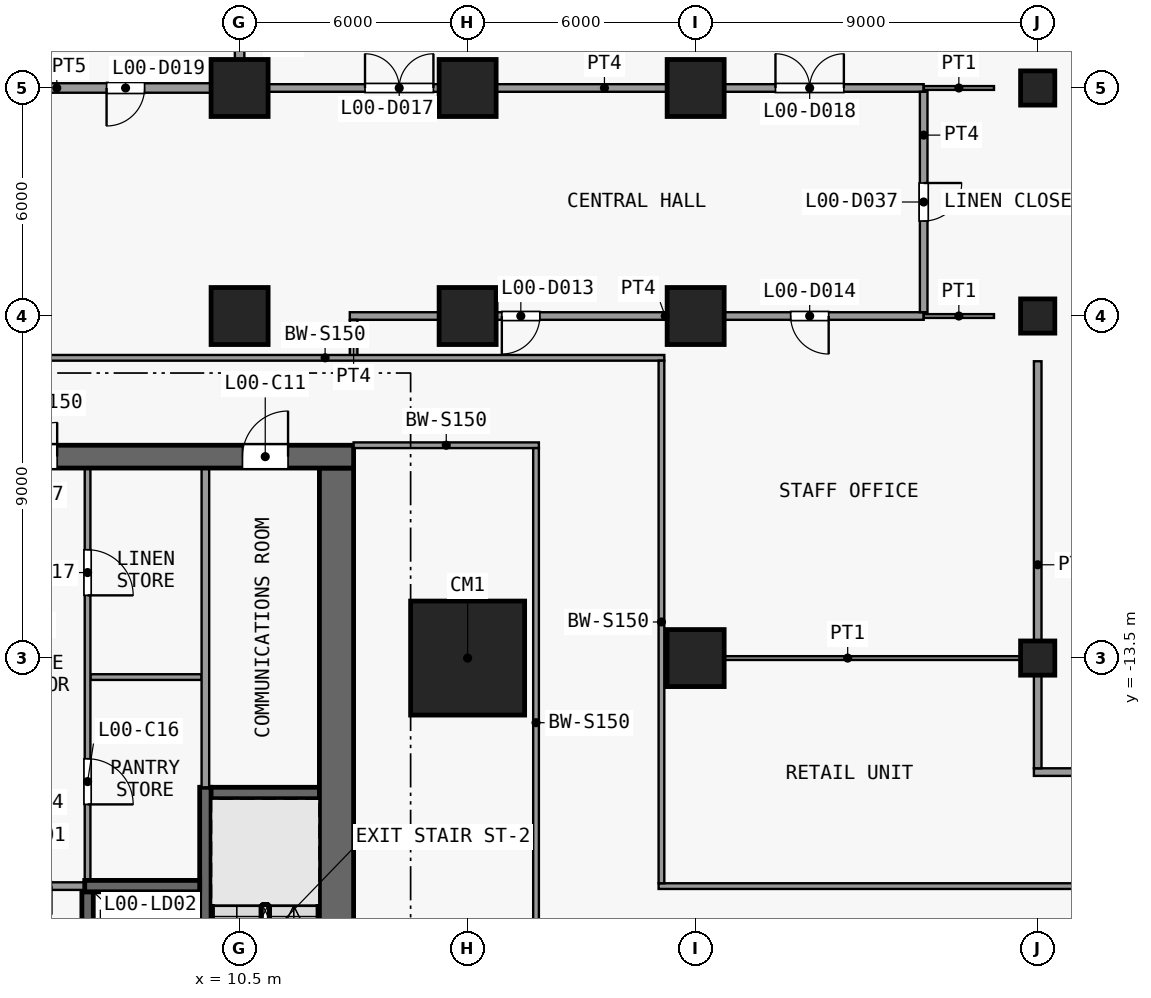
"""IFC4 building model, lengths in metres.
Left out: names, types, materials, properties, quantities, classifications, styles, units other than length and angle.
Written with IfcOpenShell. Run it as: python <this file> out.ifc"""

import sys

from ifc_helpers import new_model, si_unit, direction, frame, frame_2d, origin, origin_2d, place, context, subcontext, project, spatial, rectangle, extrude, element, fill, save


model = new_model("IFC4")
c1 = context("Model", 3, precision=1e-05, world=origin(), true_north=direction((0.0, 1.0)))
c2 = subcontext(c1, "Body", "Model", "MODEL_VIEW")
j1 = project(units=[si_unit("LENGTHUNIT", "METRE"), si_unit("PLANEANGLEUNIT", "RADIAN")], contexts=[c1])
p1 = place(None, origin())
s1 = spatial("IfcSite", under=j1, at=p1, CompositionType="ELEMENT")
p2 = place(p1, origin())
s2 = spatial("IfcBuilding", under=s1, at=p2, CompositionType="ELEMENT")
p3 = place(p2, origin())
s3 = spatial("IfcBuildingStorey", under=s2, at=p3, CompositionType="ELEMENT", Elevation=0.0)
for number, where, z_axis, x_axis in (
    (1, (10.5, -4.5, 0.0), (0.0, 0.0, 1.0), (1.0, 0.0, 0.0)),
    (2, (10.5, 1.5, 0.0), (0.0, 0.0, 1.0), (1.0, 0.0, 0.0)),
):
    element("IfcColumn", number, at=place(p3, frame(where, z_axis=z_axis, x_axis=x_axis)), inside=s3, PredefinedType="COLUMN", context=c2, shape_type="SweptSolid", body=[
        extrude(rectangle(XDim=1.5, YDim=1.5, at=origin_2d()), origin(), (0.0, 0.0, 1.0), 8.0),
    ])
p4 = place(p3, frame((16.5, -13.5, 0.0), z_axis=(0.0, 0.0, 1.0), x_axis=(1.0, 0.0, 0.0)))
e3 = element("IfcColumn", 3, at=p4, inside=s3, PredefinedType="COLUMN", context=c2, shape_type="SweptSolid", body=[
    extrude(rectangle(XDim=3.0, YDim=3.0, at=origin_2d()), origin(), (0.0, 0.0, 1.0), 8.0),
])
for number, where, z_axis, x_axis in (
    (4, (16.5, -4.5, 0.0), (0.0, 0.0, 1.0), (1.0, 0.0, 0.0)),
    (5, (16.5, 1.5, 0.0), (0.0, 0.0, 1.0), (1.0, 0.0, 0.0)),
    (6, (22.5, -13.5, 0.0), (0.0, 0.0, 1.0), (1.0, 0.0, 0.0)),
    (7, (22.5, -4.5, 0.0), (0.0, 0.0, 1.0), (1.0, 0.0, 0.0)),
    (8, (22.5, 1.5, 0.0), (0.0, 0.0, 1.0), (1.0, 0.0, 0.0)),
):
    element("IfcColumn", number, at=place(p3, frame(where, z_axis=z_axis, x_axis=x_axis)), inside=s3, PredefinedType="COLUMN", context=c2, shape_type="SweptSolid", body=[
        extrude(rectangle(XDim=1.5, YDim=1.5, at=origin_2d()), origin(), (0.0, 0.0, 1.0), 8.0),
    ])
for number, where, z_axis, x_axis in (
    (9, (31.5, -13.5, 0.0), (0.0, 0.0, 1.0), (1.0, 0.0, 0.0)),
    (10, (31.5, -4.5, 0.0), (0.0, 0.0, 1.0), (1.0, 0.0, 0.0)),
    (11, (31.5, 1.5, 0.0), (0.0, 0.0, 1.0), (1.0, 0.0, 0.0)),
):
    element("IfcColumn", number, at=place(p3, frame(where, z_axis=z_axis, x_axis=x_axis)), inside=s3, PredefinedType="COLUMN", context=c2, shape_type="SweptSolid", body=[
        extrude(rectangle(XDim=0.9, YDim=0.9, at=origin_2d()), origin(), (0.0, 0.0, 1.0), 8.0),
    ])
p5 = place(p3, frame((-13.5, -8.2, 0.0), z_axis=(0.0, 0.0, 1.0), x_axis=(1.0, 0.0, 0.0)))
e12 = element("IfcWall", 12, at=p5, inside=s3, PredefinedType="SHEAR", context=c2, shape_type="SweptSolid", body=[
    extrude(rectangle(XDim=27.0, YDim=0.6, at=frame_2d((13.5, 0.0))), origin(), (0.0, 0.0, 1.0), 7.65),
])
p6 = place(p5, frame((7.8, 0.0, 0.0)))
e13 = element("IfcOpeningElement", 13, at=p6, cuts=e12, PredefinedType="OPENING", context=c2, shape_type="SweptSolid", body=[
    extrude(rectangle(XDim=1.8, YDim=2.1, at=frame_2d((0.9, 1.05))), frame((0.0, 0.31, 0.0), z_axis=(0.0, -1.0, 0.0), x_axis=(1.0, 0.0, 0.0)), (0.0, 0.0, 1.0), 0.62),
])
p7 = place(p5, frame((17.4, 0.0, 0.0)))
e14 = element("IfcOpeningElement", 14, at=p7, cuts=e12, PredefinedType="OPENING", context=c2, shape_type="SweptSolid", body=[
    extrude(rectangle(XDim=1.8, YDim=2.1, at=frame_2d((0.9, 1.05))), frame((0.0, 0.31, 0.0), z_axis=(0.0, -1.0, 0.0), x_axis=(1.0, 0.0, 0.0)), (0.0, 0.0, 1.0), 0.62),
])
p8 = place(p5, frame((2.725, 0.0, 0.0)))
e15 = element("IfcOpeningElement", 15, at=p8, cuts=e12, PredefinedType="OPENING", context=c2, shape_type="SweptSolid", body=[
    extrude(rectangle(XDim=0.9, YDim=2.1, at=frame_2d((0.45, 1.05))), frame((0.0, 0.31, 0.0), z_axis=(0.0, -1.0, 0.0), x_axis=(1.0, 0.0, 0.0)), (0.0, 0.0, 1.0), 0.62),
])
p9 = place(p5, frame((24.075, 0.0, 0.0)))
e16 = element("IfcOpeningElement", 16, at=p9, cuts=e12, PredefinedType="OPENING", context=c2, shape_type="SweptSolid", body=[
    extrude(rectangle(XDim=1.2, YDim=2.1, at=frame_2d((0.6, 1.05))), frame((0.0, 0.31, 0.0), z_axis=(0.0, -1.0, 0.0), x_axis=(1.0, 0.0, 0.0)), (0.0, 0.0, 1.0), 0.62),
])
p10 = place(p3, frame((13.05, -24.6, 0.0), z_axis=(0.0, 0.0, 1.0), x_axis=(0.0, 1.0, 0.0)))
e17 = element("IfcWall", 17, at=p10, inside=s3, PredefinedType="SHEAR", context=c2, shape_type="SweptSolid", body=[
    extrude(rectangle(XDim=16.1, YDim=0.9, at=frame_2d((8.05, 0.0))), origin(), (0.0, 0.0, 1.0), 7.65),
])
p11 = place(p3, frame((6.575, -19.5, 0.0), z_axis=(0.0, 0.0, 1.0), x_axis=(-1.0, 0.0, 0.0)))
e18 = element("IfcWall", 18, at=p11, inside=s3, PredefinedType="PARTITIONING", context=c2, shape_type="SweptSolid", body=[
    extrude(rectangle(XDim=3.55, YDim=0.2, at=frame_2d((1.775, 0.0))), origin(), (0.0, 0.0, 1.0), 7.65),
])
p12 = place(p11, frame((1.025, 0.0, 0.0)))
e19 = element("IfcOpeningElement", 19, at=p12, cuts=e18, PredefinedType="OPENING", context=c2, shape_type="SweptSolid", body=[
    extrude(rectangle(XDim=1.5, YDim=2.1, at=frame_2d((0.75, 1.05))), frame((0.0, 0.11, 0.0), z_axis=(0.0, -1.0, 0.0), x_axis=(1.0, 0.0, 0.0)), (0.0, 0.0, 1.0), 0.22),
])
p13 = place(p3, frame((6.425, -19.5, 0.0), z_axis=(0.0, 0.0, 1.0), x_axis=(1.0, 0.0, 0.0)))
e20 = element("IfcWall", 20, at=p13, inside=s3, PredefinedType="SHEAR", context=c2, shape_type="SweptSolid", body=[
    extrude(rectangle(XDim=3.025, YDim=0.3, at=frame_2d((1.512, 0.0))), origin(), (0.0, 0.0, 1.0), 7.65),
])
p14 = place(p3, frame((9.5, -17.05, 0.0), z_axis=(0.0, 0.0, 1.0), x_axis=(1.0, 0.0, 0.0)))
e21 = element("IfcWall", 21, at=p14, inside=s3, PredefinedType="SHEAR", context=c2, shape_type="SweptSolid", body=[
    extrude(rectangle(XDim=3.1, YDim=0.3, at=frame_2d((1.55, 0.0))), origin(), (0.0, 0.0, 1.0), 7.65),
])
p15 = place(p3, frame((6.575, -14.0, 0.0), z_axis=(0.0, 0.0, 1.0), x_axis=(1.0, 0.0, 0.0)))
e22 = element("IfcWall", 22, at=p15, inside=s3, PredefinedType="PARTITIONING", context=c2, shape_type="SweptSolid", body=[
    extrude(rectangle(XDim=2.925, YDim=0.15, at=frame_2d((1.462, 0.0))), origin(), (0.0, 0.0, 1.0), 7.65),
])
p16 = place(p3, frame((6.5, -22.25, 0.0), z_axis=(0.0, 0.0, 1.0), x_axis=(0.0, 1.0, 0.0)))
e23 = element("IfcWall", 23, at=p16, inside=s3, PredefinedType="SHEAR", context=c2, shape_type="SweptSolid", body=[
    extrude(rectangle(XDim=2.6, YDim=0.3, at=frame_2d((1.3, 0.0))), origin(), (0.0, 0.0, 1.0), 7.65),
])
p17 = place(p16, frame((0.75, 0.0, 0.0)))
e24 = element("IfcOpeningElement", 24, at=p17, cuts=e23, PredefinedType="OPENING", context=c2, shape_type="SweptSolid", body=[
    extrude(rectangle(XDim=1.1, YDim=2.1, at=frame_2d((0.55, 1.05))), frame((0.0, 0.16, 0.0), z_axis=(0.0, -1.0, 0.0), x_axis=(1.0, 0.0, 0.0)), (0.0, 0.0, 1.0), 0.32),
])
p18 = place(p3, frame((6.5, -8.5, 0.0), z_axis=(0.0, 0.0, 1.0), x_axis=(0.0, -1.0, 0.0)))
e25 = element("IfcWall", 25, at=p18, inside=s3, PredefinedType="PARTITIONING", context=c2, shape_type="SweptSolid", body=[
    extrude(rectangle(XDim=10.85, YDim=0.15, at=frame_2d((5.425, 0.0))), origin(), (0.0, 0.0, 1.0), 7.65),
])
p19 = place(p18, frame((7.65, 0.0, 0.0)))
e26 = element("IfcOpeningElement", 26, at=p19, cuts=e25, PredefinedType="OPENING", context=c2, shape_type="SweptSolid", body=[
    extrude(rectangle(XDim=1.2, YDim=2.1, at=frame_2d((0.6, 1.05))), frame((0.0, 0.085, 0.0), z_axis=(0.0, -1.0, 0.0), x_axis=(1.0, 0.0, 0.0)), (0.0, 0.0, 1.0), 0.17),
])
p20 = place(p18, frame((2.15, 0.0, 0.0)))
e27 = element("IfcOpeningElement", 27, at=p20, cuts=e25, PredefinedType="OPENING", context=c2, shape_type="SweptSolid", body=[
    extrude(rectangle(XDim=1.2, YDim=2.1, at=frame_2d((0.6, 1.05))), frame((0.0, 0.085, 0.0), z_axis=(0.0, -1.0, 0.0), x_axis=(1.0, 0.0, 0.0)), (0.0, 0.0, 1.0), 0.17),
])
p21 = place(p3, frame((9.6, -16.9, 0.0), z_axis=(0.0, 0.0, 1.0), x_axis=(0.0, -1.0, 0.0)))
e28 = element("IfcWall", 28, at=p21, inside=s3, PredefinedType="SHEAR", context=c2, shape_type="SweptSolid", body=[
    extrude(rectangle(XDim=7.7, YDim=0.3, at=frame_2d((3.85, 0.0))), origin(), (0.0, 0.0, 1.0), 7.65),
])
p22 = place(p21, frame((6.5, 0.0, 0.0)))
e29 = element("IfcOpeningElement", 29, at=p22, cuts=e28, PredefinedType="OPENING", context=c2, shape_type="SweptSolid", body=[
    extrude(rectangle(XDim=1.1, YDim=2.1, at=frame_2d((0.55, 1.05))), frame((0.0, 0.16, 0.0), z_axis=(0.0, -1.0, 0.0), x_axis=(1.0, 0.0, 0.0)), (0.0, 0.0, 1.0), 0.32),
])
p23 = place(p3, frame((9.6, -16.9, 0.0), z_axis=(0.0, 0.0, 1.0), x_axis=(0.0, 1.0, 0.0)))
e30 = element("IfcWall", 30, at=p23, inside=s3, PredefinedType="PARTITIONING", context=c2, shape_type="SweptSolid", body=[
    extrude(rectangle(XDim=8.4, YDim=0.2, at=frame_2d((4.2, 0.0))), origin(), (0.0, 0.0, 1.0), 7.65),
])
p24 = place(p3, frame((21.525, -19.5, 0.0), z_axis=(0.0, 0.0, 1.0), x_axis=(1.0, 0.0, 0.0)))
e31 = element("IfcWall", 31, at=p24, inside=s3, PredefinedType="PARTITIONING", context=c2, shape_type="SweptSolid", body=[
    extrude(rectangle(XDim=28.05, YDim=0.15, at=frame_2d((14.025, 0.0))), origin(), (0.0, 0.0, 1.0), 7.65),
])
p25 = place(p3, frame((13.5, -7.9, 0.0), z_axis=(0.0, 0.0, 1.0), x_axis=(1.0, 0.0, 0.0)))
e32 = element("IfcWall", 32, at=p25, inside=s3, PredefinedType="PARTITIONING", context=c2, shape_type="SweptSolid", body=[
    extrude(rectangle(XDim=4.875, YDim=0.15, at=frame_2d((2.438, 0.0))), origin(), (0.0, 0.0, 1.0), 7.65),
])
p26 = place(p3, frame((3.825, -5.6, 0.0), z_axis=(0.0, 0.0, 1.0), x_axis=(1.0, 0.0, 0.0)))
e33 = element("IfcWall", 33, at=p26, inside=s3, PredefinedType="PARTITIONING", context=c2, shape_type="SweptSolid", body=[
    extrude(rectangle(XDim=17.85, YDim=0.15, at=frame_2d((8.925, 0.0))), origin(), (0.0, 0.0, 1.0), 7.65),
])
p27 = place(p3, frame((18.3, -22.425, 0.0), z_axis=(0.0, 0.0, 1.0), x_axis=(0.0, 1.0, 0.0)))
e34 = element("IfcWall", 34, at=p27, inside=s3, PredefinedType="PARTITIONING", context=c2, shape_type="SweptSolid", body=[
    extrude(rectangle(XDim=14.45, YDim=0.15, at=frame_2d((7.225, 0.0))), origin(), (0.0, 0.0, 1.0), 7.65),
])
p28 = place(p3, frame((21.6, -19.425, 0.0), z_axis=(0.0, 0.0, 1.0), x_axis=(0.0, 1.0, 0.0)))
e35 = element("IfcWall", 35, at=p28, inside=s3, PredefinedType="PARTITIONING", context=c2, shape_type="SweptSolid", body=[
    extrude(rectangle(XDim=13.75, YDim=0.15, at=frame_2d((6.875, 0.0))), origin(), (0.0, 0.0, 1.0), 7.65),
])
p29 = place(p3, frame((31.4, -16.5, 0.0), z_axis=(0.0, 0.0, 1.0), x_axis=(1.0, 0.0, 0.0)))
e36 = element("IfcWall", 36, at=p29, inside=s3, PredefinedType="PARTITIONING", context=c2, shape_type="SweptSolid", body=[
    extrude(rectangle(XDim=18.1, YDim=0.2, at=frame_2d((9.05, 0.0))), origin(), (0.0, 0.0, 1.0), 7.65),
])
p30 = place(p29, frame((3.2, 0.0, 0.0)))
e37 = element("IfcOpeningElement", 37, at=p30, cuts=e36, PredefinedType="OPENING", context=c2, shape_type="SweptSolid", body=[
    extrude(rectangle(XDim=1.0, YDim=2.1, at=frame_2d((0.5, 1.05))), frame((0.0, 0.11, 0.0), z_axis=(0.0, -1.0, 0.0), x_axis=(1.0, 0.0, 0.0)), (0.0, 0.0, 1.0), 0.22),
])
p31 = place(p29, frame((14.0, 0.0, 0.0)))
e38 = element("IfcOpeningElement", 38, at=p31, cuts=e36, PredefinedType="OPENING", context=c2, shape_type="SweptSolid", body=[
    extrude(rectangle(XDim=1.0, YDim=2.1, at=frame_2d((0.5, 1.05))), frame((0.0, 0.11, 0.0), z_axis=(0.0, -1.0, 0.0), x_axis=(1.0, 0.0, 0.0)), (0.0, 0.0, 1.0), 0.22),
])
p32 = place(p3, frame((21.6, -13.5, 0.0), z_axis=(0.0, 0.0, 1.0), x_axis=(1.0, 0.0, 0.0)))
e39 = element("IfcWall", 39, at=p32, inside=s3, PredefinedType="PARTITIONING", context=c2, shape_type="SweptSolid", body=[
    extrude(rectangle(XDim=9.8, YDim=0.1, at=frame_2d((4.9, 0.0))), origin(), (0.0, 0.0, 1.0), 7.65),
])
p33 = place(p3, frame((13.4, -4.5, 0.0), z_axis=(0.0, 0.0, 1.0), x_axis=(1.0, 0.0, 0.0)))
e40 = element("IfcWall", 40, at=p33, inside=s3, PredefinedType="PARTITIONING", context=c2, shape_type="SweptSolid", body=[
    extrude(rectangle(XDim=15.1, YDim=0.2, at=frame_2d((7.55, 0.0))), origin(), (0.0, 0.0, 1.0), 7.65),
])
p34 = place(p33, frame((4.0, 0.0, 0.0)))
e41 = element("IfcOpeningElement", 41, at=p34, cuts=e40, PredefinedType="OPENING", context=c2, shape_type="SweptSolid", body=[
    extrude(rectangle(XDim=1.0, YDim=2.1, at=frame_2d((0.5, 1.05))), frame((0.0, 0.11, 0.0), z_axis=(0.0, -1.0, 0.0), x_axis=(1.0, 0.0, 0.0)), (0.0, 0.0, 1.0), 0.22),
])
p35 = place(p33, frame((11.6, 0.0, 0.0)))
e42 = element("IfcOpeningElement", 42, at=p35, cuts=e40, PredefinedType="OPENING", context=c2, shape_type="SweptSolid", body=[
    extrude(rectangle(XDim=1.0, YDim=2.1, at=frame_2d((0.5, 1.05))), frame((0.0, 0.11, 0.0), z_axis=(0.0, -1.0, 0.0), x_axis=(1.0, 0.0, 0.0)), (0.0, 0.0, 1.0), 0.22),
])
p36 = place(p3, frame((28.5, -4.5, 0.0), z_axis=(0.0, 0.0, 1.0), x_axis=(1.0, 0.0, 0.0)))
e43 = element("IfcWall", 43, at=p36, inside=s3, PredefinedType="PARTITIONING", context=c2, shape_type="SweptSolid", body=[
    extrude(rectangle(XDim=1.85, YDim=0.1, at=frame_2d((0.925, 0.0))), origin(), (0.0, 0.0, 1.0), 7.65),
])
p37 = place(p3, frame((10.5, 1.5, 0.0), z_axis=(0.0, 0.0, 1.0), x_axis=(1.0, 0.0, 0.0)))
e44 = element("IfcWall", 44, at=p37, inside=s3, PredefinedType="PARTITIONING", context=c2, shape_type="SweptSolid", body=[
    extrude(rectangle(XDim=18.0, YDim=0.2, at=frame_2d((9.0, 0.0))), origin(), (0.0, 0.0, 1.0), 7.65),
])
p38 = place(p37, frame((3.3, 0.0, 0.0)))
e45 = element("IfcOpeningElement", 45, at=p38, cuts=e44, PredefinedType="OPENING", context=c2, shape_type="SweptSolid", body=[
    extrude(rectangle(XDim=1.8, YDim=2.1, at=frame_2d((0.9, 1.05))), frame((0.0, 0.11, 0.0), z_axis=(0.0, -1.0, 0.0), x_axis=(1.0, 0.0, 0.0)), (0.0, 0.0, 1.0), 0.22),
])
p39 = place(p37, frame((14.1, 0.0, 0.0)))
e46 = element("IfcOpeningElement", 46, at=p39, cuts=e44, PredefinedType="OPENING", context=c2, shape_type="SweptSolid", body=[
    extrude(rectangle(XDim=1.8, YDim=2.1, at=frame_2d((0.9, 1.05))), frame((0.0, 0.11, 0.0), z_axis=(0.0, -1.0, 0.0), x_axis=(1.0, 0.0, 0.0)), (0.0, 0.0, 1.0), 0.22),
])
p40 = place(p3, frame((28.5, 1.5, 0.0), z_axis=(0.0, 0.0, 1.0), x_axis=(1.0, 0.0, 0.0)))
e47 = element("IfcWall", 47, at=p40, inside=s3, PredefinedType="PARTITIONING", context=c2, shape_type="SweptSolid", body=[
    extrude(rectangle(XDim=1.85, YDim=0.1, at=frame_2d((0.925, 0.0))), origin(), (0.0, 0.0, 1.0), 7.65),
])
p41 = place(p3, frame((4.5, 1.5, 0.0), z_axis=(0.0, 0.0, 1.0), x_axis=(1.0, 0.0, 0.0)))
e48 = element("IfcWall", 48, at=p41, inside=s3, PredefinedType="PARTITIONING", context=c2, shape_type="SweptSolid", body=[
    extrude(rectangle(XDim=6.0, YDim=0.25, at=frame_2d((3.0, 0.0))), origin(), (0.0, 0.0, 1.0), 7.65),
])
p42 = place(p41, frame((2.5, 0.0, 0.0)))
e49 = element("IfcOpeningElement", 49, at=p42, cuts=e48, PredefinedType="OPENING", context=c2, shape_type="SweptSolid", body=[
    extrude(rectangle(XDim=1.0, YDim=2.1, at=frame_2d((0.5, 1.05))), frame((0.0, 0.135, 0.0), z_axis=(0.0, -1.0, 0.0), x_axis=(1.0, 0.0, 0.0)), (0.0, 0.0, 1.0), 0.27),
])
p43 = place(p3, frame((10.5, 1.625, 0.0), z_axis=(0.0, 0.0, 1.0), x_axis=(0.0, 1.0, 0.0)))
e50 = element("IfcWall", 50, at=p43, inside=s3, PredefinedType="PARTITIONING", context=c2, shape_type="SweptSolid", body=[
    extrude(rectangle(XDim=5.75, YDim=0.25, at=frame_2d((2.875, 0.0))), origin(), (0.0, 0.0, 1.0), 7.65),
])
p44 = place(p3, frame((13.5, -5.6, 0.0), z_axis=(0.0, 0.0, 1.0), x_axis=(0.0, 1.0, 0.0)))
e51 = element("IfcWall", 51, at=p44, inside=s3, PredefinedType="PARTITIONING", context=c2, shape_type="SweptSolid", body=[
    extrude(rectangle(XDim=1.0, YDim=0.2, at=frame_2d((0.5, 0.0))), origin(), (0.0, 0.0, 1.0), 7.65),
])
p45 = place(p3, frame((28.5, -4.4, 0.0), z_axis=(0.0, 0.0, 1.0), x_axis=(0.0, 1.0, 0.0)))
e52 = element("IfcWall", 52, at=p45, inside=s3, PredefinedType="PARTITIONING", context=c2, shape_type="SweptSolid", body=[
    extrude(rectangle(XDim=5.8, YDim=0.2, at=frame_2d((2.9, 0.0))), origin(), (0.0, 0.0, 1.0), 7.65),
])
p46 = place(p45, frame((2.4, 0.0, 0.0)))
e53 = element("IfcOpeningElement", 53, at=p46, cuts=e52, PredefinedType="OPENING", context=c2, shape_type="SweptSolid", body=[
    extrude(rectangle(XDim=1.0, YDim=2.1, at=frame_2d((0.5, 1.05))), frame((0.0, 0.11, 0.0), z_axis=(0.0, -1.0, 0.0), x_axis=(1.0, 0.0, 0.0)), (0.0, 0.0, 1.0), 0.22),
])
p47 = place(p3, frame((31.5, -16.4, 0.0), z_axis=(0.0, 0.0, 1.0), x_axis=(0.0, 1.0, 0.0)))
e54 = element("IfcWall", 54, at=p47, inside=s3, PredefinedType="PARTITIONING", context=c2, shape_type="SweptSolid", body=[
    extrude(rectangle(XDim=10.71, YDim=0.2, at=frame_2d((5.355, 0.0))), origin(), (0.0, 0.0, 1.0), 7.65),
])
p48 = place(p7, origin())
e55 = element("IfcDoor", 55, at=p48, inside=s3, OperationType="DOUBLE_DOOR_SINGLE_SWING", PredefinedType="DOOR", context=c2, shape_type="SweptSolid", body=[
    extrude(rectangle(XDim=1.8, YDim=2.1, at=frame_2d((0.9, 1.05))), frame((0.0, 0.025, 0.0), z_axis=(0.0, -1.0, 0.0), x_axis=(1.0, 0.0, 0.0)), (0.0, 0.0, 1.0), 0.05),
])
fill(e14, e55)
p49 = place(p9, origin())
e56 = element("IfcDoor", 56, at=p49, inside=s3, OperationType="SINGLE_SWING_RIGHT", PredefinedType="DOOR", context=c2, shape_type="SweptSolid", body=[
    extrude(rectangle(XDim=1.2, YDim=2.1, at=frame_2d((0.6, 1.05))), frame((0.0, 0.025, 0.0), z_axis=(0.0, -1.0, 0.0), x_axis=(1.0, 0.0, 0.0)), (0.0, 0.0, 1.0), 0.05),
])
fill(e16, e56)
p50 = place(p19, origin())
e57 = element("IfcDoor", 57, at=p50, inside=s3, OperationType="SINGLE_SWING_RIGHT", PredefinedType="DOOR", context=c2, shape_type="SweptSolid", body=[
    extrude(rectangle(XDim=1.2, YDim=2.1, at=frame_2d((0.6, 1.05))), frame((0.0, 0.025, 0.0), z_axis=(0.0, -1.0, 0.0), x_axis=(1.0, 0.0, 0.0)), (0.0, 0.0, 1.0), 0.05),
])
fill(e26, e57)
p51 = place(p20, origin())
e58 = element("IfcDoor", 58, at=p51, inside=s3, OperationType="SINGLE_SWING_RIGHT", PredefinedType="DOOR", context=c2, shape_type="SweptSolid", body=[
    extrude(rectangle(XDim=1.2, YDim=2.1, at=frame_2d((0.6, 1.05))), frame((0.0, 0.025, 0.0), z_axis=(0.0, -1.0, 0.0), x_axis=(1.0, 0.0, 0.0)), (0.0, 0.0, 1.0), 0.05),
])
fill(e27, e58)
p52 = place(p34, origin())
e59 = element("IfcDoor", 59, at=p52, inside=s3, OperationType="SINGLE_SWING_LEFT", PredefinedType="DOOR", context=c2, shape_type="SweptSolid", body=[
    extrude(rectangle(XDim=1.0, YDim=2.1, at=frame_2d((0.5, 1.05))), frame((0.0, 0.025, 0.0), z_axis=(0.0, -1.0, 0.0), x_axis=(1.0, 0.0, 0.0)), (0.0, 0.0, 1.0), 0.05),
])
fill(e41, e59)
p53 = place(p35, origin())
e60 = element("IfcDoor", 60, at=p53, inside=s3, OperationType="SINGLE_SWING_RIGHT", PredefinedType="DOOR", context=c2, shape_type="SweptSolid", body=[
    extrude(rectangle(XDim=1.0, YDim=2.1, at=frame_2d((0.5, 1.05))), frame((0.0, 0.025, 0.0), z_axis=(0.0, -1.0, 0.0), x_axis=(1.0, 0.0, 0.0)), (0.0, 0.0, 1.0), 0.05),
])
fill(e42, e60)
p54 = place(p38, origin())
e61 = element("IfcDoor", 61, at=p54, inside=s3, OperationType="DOUBLE_DOOR_SINGLE_SWING", PredefinedType="DOOR", context=c2, shape_type="SweptSolid", body=[
    extrude(rectangle(XDim=1.8, YDim=2.1, at=frame_2d((0.9, 1.05))), frame((0.0, 0.025, 0.0), z_axis=(0.0, -1.0, 0.0), x_axis=(1.0, 0.0, 0.0)), (0.0, 0.0, 1.0), 0.05),
])
fill(e45, e61)
p55 = place(p39, origin())
e62 = element("IfcDoor", 62, at=p55, inside=s3, OperationType="DOUBLE_DOOR_SINGLE_SWING", PredefinedType="DOOR", context=c2, shape_type="SweptSolid", body=[
    extrude(rectangle(XDim=1.8, YDim=2.1, at=frame_2d((0.9, 1.05))), frame((0.0, 0.025, 0.0), z_axis=(0.0, -1.0, 0.0), x_axis=(1.0, 0.0, 0.0)), (0.0, 0.0, 1.0), 0.05),
])
fill(e46, e62)
p56 = place(p42, origin())
e63 = element("IfcDoor", 63, at=p56, inside=s3, OperationType="SINGLE_SWING_LEFT", PredefinedType="DOOR", context=c2, shape_type="SweptSolid", body=[
    extrude(rectangle(XDim=1.0, YDim=2.1, at=frame_2d((0.5, 1.05))), frame((0.0, 0.025, 0.0), z_axis=(0.0, -1.0, 0.0), x_axis=(1.0, 0.0, 0.0)), (0.0, 0.0, 1.0), 0.05),
])
fill(e49, e63)
p57 = place(p46, origin())
e64 = element("IfcDoor", 64, at=p57, inside=s3, OperationType="SINGLE_SWING_RIGHT", PredefinedType="DOOR", context=c2, shape_type="SweptSolid", body=[
    extrude(rectangle(XDim=1.0, YDim=2.1, at=frame_2d((0.5, 1.05))), frame((0.0, 0.025, 0.0), z_axis=(0.0, -1.0, 0.0), x_axis=(1.0, 0.0, 0.0)), (0.0, 0.0, 1.0), 0.05),
])
fill(e53, e64)
save(model, sys.argv[1])
